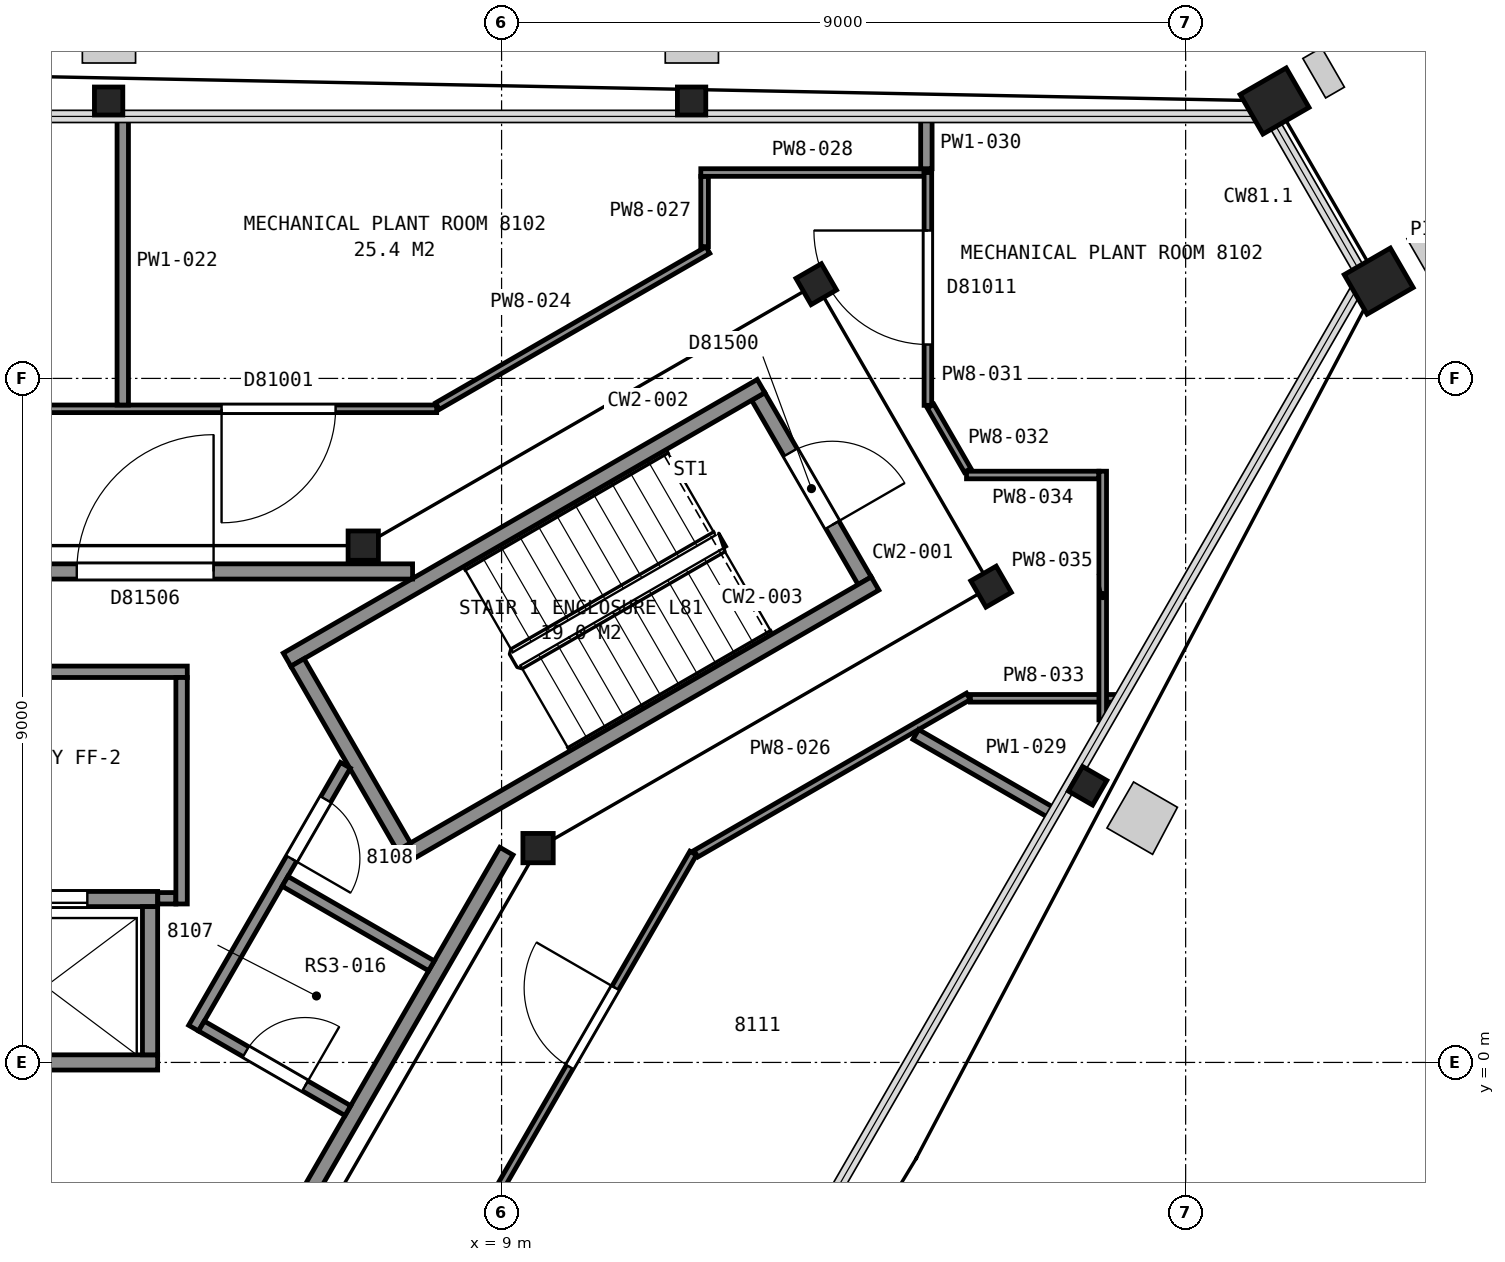
"""IFC4 building model, lengths in metres.
Left out: names, types, materials, properties, quantities, classifications, styles, units other than length and angle.
Written with IfcOpenShell. Run it as: python <this file> out.ifc"""

import sys

from ifc_helpers import new_model, si_unit, direction, frame, frame_2d, origin, origin_2d, place, context, subcontext, project, spatial, rectangle, hollow_rectangle, i_section, extrude, element, fill, save


model = new_model("IFC4")
c1 = context("Model", 3, precision=1e-05, world=origin(), true_north=direction((0.0, 1.0)))
c2 = subcontext(c1, "Body", "Model", "MODEL_VIEW")
j1 = project(units=[si_unit("LENGTHUNIT", "METRE"), si_unit("PLANEANGLEUNIT", "RADIAN")], contexts=[c1])
p1 = place(None, origin())
s1 = spatial("IfcSite", under=j1, at=p1, CompositionType="ELEMENT")
p2 = place(p1, origin())
s2 = spatial("IfcBuilding", under=s1, at=p2, CompositionType="ELEMENT")
p3 = place(p2, frame((0.0, 0.0, 321.0)))
s3 = spatial("IfcBuildingStorey", under=s2, at=p3, CompositionType="ELEMENT", Elevation=321.0)
p4 = place(p3, frame((19.17, 12.65, 0.0), z_axis=(0.0, 0.0, 1.0), x_axis=(0.5, -0.866025403784, 0.0)))
e1 = element("IfcColumn", 1, at=p4, inside=s3, PredefinedType="COLUMN", context=c2, shape_type="SweptSolid", body=[
    extrude(hollow_rectangle(XDim=0.6, YDim=0.7, WallThickness=0.04, at=origin_2d()), origin(), (0.0, 0.0, 1.0), 4.2),
])
for number, where, z_axis, x_axis in (
    (2, (11.5, 12.65, 0.0), (0.0, 0.0, 1.0), (1.0, 0.0, 0.0)),
    (3, (3.83, 12.65, 0.0), (0.0, 0.0, 1.0), (1.0, 0.0, 0.0)),
    (4, (16.71, 3.64, 0.0), (0.0, 0.0, 1.0), (-0.5, -0.866, 0.0)),
):
    element("IfcColumn", number, at=place(p3, frame(where, z_axis=z_axis, x_axis=x_axis)), inside=s3, PredefinedType="COLUMN", context=c2, shape_type="SweptSolid", body=[
        extrude(i_section(OverallWidth=0.373, OverallDepth=0.368, WebThickness=0.015, FlangeThickness=0.024, FilletRadius=0.015, at=origin_2d()), origin(), (0.0, 0.0, 1.0), 4.2),
    ])
p5 = place(p3, frame((20.54, 10.28, 0.0), z_axis=(0.0, 0.0, 1.0), x_axis=(0.5, -0.866025403784, 0.0)))
e5 = element("IfcColumn", 5, at=p5, inside=s3, PredefinedType="COLUMN", context=c2, shape_type="SweptSolid", body=[
    extrude(hollow_rectangle(XDim=0.6, YDim=0.7, WallThickness=0.04, at=origin_2d()), origin(), (0.0, 0.0, 1.0), 4.2),
])
for number, where, z_axis, x_axis in (
    (6, (9.48, 2.82, 0.0), (0.0, 0.0, 1.0), (1.0, 0.0, 0.0)),
    (7, (15.44, 6.26, 0.0), (0.0, 0.0, 1.0), (0.5, -0.866, 0.0)),
    (8, (13.14, 10.24, 0.0), (0.0, 0.0, 1.0), (0.5, -0.866, 0.0)),
    (9, (7.18, 6.8, 0.0), (0.0, 0.0, 1.0), (1.0, 0.0, 0.0)),
):
    element("IfcColumn", number, at=place(p3, frame(where, z_axis=z_axis, x_axis=x_axis)), inside=s3, PredefinedType="COLUMN", context=c2, shape_type="SweptSolid", body=[
        extrude(i_section(OverallWidth=0.399, OverallDepth=0.386, WebThickness=0.021, FlangeThickness=0.033, FilletRadius=0.015, at=origin_2d()), origin(), (0.0, 0.0, 1.0), 4.2),
    ])
p6 = place(p3, frame((13.777, 6.338, 0.0), z_axis=(0.0, 0.0, 1.0), x_axis=(-0.500049511043, 0.865996816683, 0.0)))
e10 = element("IfcWall", 10, at=p6, inside=s3, PredefinedType="PARTITIONING", context=c2, shape_type="SweptSolid", body=[
    extrude(rectangle(XDim=2.8, YDim=0.2, at=frame_2d((1.4, 0.0))), origin(), (0.0, 0.0, 1.0), 3.95),
])
p7 = place(p6, frame((0.85, 0.0, 0.0)))
e11 = element("IfcOpeningElement", 11, at=p7, cuts=e10, PredefinedType="OPENING", context=c2, shape_type="SweptSolid", body=[
    extrude(rectangle(XDim=1.1, YDim=2.1, at=frame_2d((0.55, 1.05))), frame((0.0, 0.11, 0.0), z_axis=(0.0, -1.0, 0.0), x_axis=(1.0, 0.0, 0.0)), (0.0, 0.0, 1.0), 0.22),
])
for number, where, z_axis, x_axis in (
    (12, (6.178, 5.299, 0.0), (0.0, 0.0, 1.0), (0.866, 0.5, 0.0)),
    (13, (7.678, 2.701, 0.0), (0.0, 0.0, 1.0), (0.866, 0.5, 0.0)),
):
    element("IfcWall", number, at=place(p3, frame(where, z_axis=z_axis, x_axis=x_axis)), inside=s3, PredefinedType="PARTITIONING", context=c2, shape_type="SweptSolid", body=[
        extrude(rectangle(XDim=7.2, YDim=0.2, at=frame_2d((3.6, 0.0))), origin(), (0.0, 0.0, 1.0), 3.95),
    ])
p8 = place(p3, frame((7.715, 2.838, 0.0), z_axis=(0.0, 0.0, 1.0), x_axis=(-0.500049511043, 0.865996816683, 0.0)))
e14 = element("IfcWall", 14, at=p8, inside=s3, PredefinedType="PARTITIONING", context=c2, shape_type="SweptSolid", body=[
    extrude(rectangle(XDim=2.8, YDim=0.2, at=frame_2d((1.4, 0.0))), origin(), (0.0, 0.0, 1.0), 3.95),
])
p9 = place(p3, frame((1.525, 0.0, 0.0), z_axis=(0.0, 0.0, 1.0), x_axis=(1.0, 0.0, 0.0)))
e15 = element("IfcWall", 15, at=p9, inside=s3, PredefinedType="PARTITIONING", context=c2, shape_type="SweptSolid", body=[
    extrude(rectangle(XDim=2.95, YDim=0.2, at=frame_2d((1.475, 0.0))), origin(), (0.0, 0.0, 1.0), 4.2),
])
p10 = place(p3, frame((1.525, 2.15, 0.0), z_axis=(0.0, 0.0, 1.0), x_axis=(1.0, 0.0, 0.0)))
e16 = element("IfcWall", 16, at=p10, inside=s3, PredefinedType="PARTITIONING", context=c2, shape_type="SweptSolid", body=[
    extrude(rectangle(XDim=2.95, YDim=0.2, at=frame_2d((1.475, 0.0))), origin(), (0.0, 0.0, 1.0), 4.2),
])
p11 = place(p10, frame((0.925, 0.0, 0.0)))
e17 = element("IfcOpeningElement", 17, at=p11, cuts=e16, PredefinedType="OPENING", context=c2, shape_type="SweptSolid", body=[
    extrude(rectangle(XDim=1.1, YDim=2.1, at=frame_2d((0.55, 1.05))), frame((0.0, 0.11, 0.0), z_axis=(0.0, -1.0, 0.0), x_axis=(1.0, 0.0, 0.0)), (0.0, 0.0, 1.0), 0.22),
])
p12 = place(p3, frame((4.375, 0.1, 0.0), z_axis=(0.0, 0.0, 1.0), x_axis=(0.0, 1.0, 0.0)))
e18 = element("IfcWall", 18, at=p12, inside=s3, PredefinedType="PARTITIONING", context=c2, shape_type="SweptSolid", body=[
    extrude(rectangle(XDim=1.95, YDim=0.2, at=frame_2d((0.975, 0.0))), origin(), (0.0, 0.0, 1.0), 4.2),
])
p13 = place(p3, frame((7.829, 6.46, 0.0), z_axis=(0.0, 0.0, 1.0), x_axis=(-1.0, 0.0, 0.0)))
e19 = element("IfcWall", 19, at=p13, inside=s3, PredefinedType="PARTITIONING", context=c2, shape_type="SweptSolid", body=[
    extrude(rectangle(XDim=15.658, YDim=0.2, at=frame_2d((7.829, 0.0))), origin(), (0.0, 0.0, 1.0), 3.95),
])
p14 = place(p13, frame((2.618, 0.0, 0.0)))
e20 = element("IfcOpeningElement", 20, at=p14, cuts=e19, PredefinedType="OPENING", context=c2, shape_type="SweptSolid", body=[
    extrude(rectangle(XDim=1.8, YDim=2.1, at=frame_2d((0.9, 1.05))), frame((0.0, 0.11, 0.0), z_axis=(0.0, -1.0, 0.0), x_axis=(1.0, 0.0, 0.0)), (0.0, 0.0, 1.0), 0.22),
])
p15 = place(p3, frame((-0.245, 5.14, 0.0), z_axis=(0.0, 0.0, 1.0), x_axis=(1.0, 0.0, 0.0)))
e21 = element("IfcWall", 21, at=p15, inside=s3, PredefinedType="PARTITIONING", context=c2, shape_type="SweptSolid", body=[
    extrude(rectangle(XDim=5.11, YDim=0.15, at=frame_2d((2.555, 0.0))), origin(), (0.0, 0.0, 1.0), 3.95),
])
p16 = place(p15, frame((1.975, 0.0, 0.0)))
e22 = element("IfcOpeningElement", 22, at=p16, cuts=e21, PredefinedType="OPENING", context=c2, shape_type="SweptSolid", body=[
    extrude(rectangle(XDim=1.0, YDim=2.1, at=frame_2d((0.5, 1.05))), frame((0.0, 0.085, 0.0), z_axis=(0.0, -1.0, 0.0), x_axis=(1.0, 0.0, 0.0)), (0.0, 0.0, 1.0), 0.17),
])
p17 = place(p3, frame((2.552, -8.5, 0.0), z_axis=(0.0, 0.0, 1.0), x_axis=(0.499967462014, 0.866044188784, 0.0)))
e23 = element("IfcWall", 23, at=p17, inside=s3, PredefinedType="PARTITIONING", context=c2, shape_type="SweptSolid", body=[
    extrude(rectangle(XDim=13.025, YDim=0.2, at=frame_2d((6.512, 0.0))), origin(), (0.0, 0.0, 1.0), 3.95),
])
p18 = place(p3, frame((4.477, 2.16, 0.0), z_axis=(0.0, 0.0, 1.0), x_axis=(1.0, 0.0, 0.0)))
e24 = element("IfcWall", 24, at=p18, inside=s3, PredefinedType="PARTITIONING", context=c2, shape_type="SweptSolid", body=[
    extrude(rectangle(XDim=0.238, YDim=0.15, at=frame_2d((0.119, 0.0))), origin(), (0.0, 0.0, 1.0), 3.95),
])
p19 = place(p3, frame((4.79, 2.085, 0.0), z_axis=(0.0, 0.0, 1.0), x_axis=(0.0, 1.0, 0.0)))
e25 = element("IfcWall", 25, at=p19, inside=s3, PredefinedType="PARTITIONING", context=c2, shape_type="SweptSolid", body=[
    extrude(rectangle(XDim=2.98, YDim=0.15, at=frame_2d((1.49, 0.0))), origin(), (0.0, 0.0, 1.0), 3.95),
])
p20 = place(p3, frame((6.946, 3.91, 0.0), z_axis=(0.0, 0.0, 1.0), x_axis=(-0.50003111728, -0.866007437469, 0.0)))
e26 = element("IfcWall", 26, at=p20, inside=s3, PredefinedType="PARTITIONING", context=c2, shape_type="SweptSolid", body=[
    extrude(rectangle(XDim=3.994, YDim=0.15, at=frame_2d((1.997, 0.0))), origin(), (0.0, 0.0, 1.0), 3.95),
])
p21 = place(p20, frame((0.519, 0.0, 0.0)))
e27 = element("IfcOpeningElement", 27, at=p21, cuts=e26, PredefinedType="OPENING", context=c2, shape_type="SweptSolid", body=[
    extrude(rectangle(XDim=0.9, YDim=2.1, at=frame_2d((0.45, 1.05))), frame((0.0, 0.085, 0.0), z_axis=(0.0, -1.0, 0.0), x_axis=(1.0, 0.0, 0.0)), (0.0, 0.0, 1.0), 0.17),
])
p22 = place(p3, frame((5.051, 0.479, 0.0), z_axis=(0.0, 0.0, 1.0), x_axis=(0.865944298464, -0.500140452231, 0.0)))
e28 = element("IfcWall", 28, at=p22, inside=s3, PredefinedType="PARTITIONING", context=c2, shape_type="SweptSolid", body=[
    extrude(rectangle(XDim=2.224, YDim=0.15, at=frame_2d((1.112, 0.0))), origin(), (0.0, 0.0, 1.0), 3.95),
])
p23 = place(p22, frame((0.675, 0.0, 0.0)))
e29 = element("IfcOpeningElement", 29, at=p23, cuts=e28, PredefinedType="OPENING", context=c2, shape_type="SweptSolid", body=[
    extrude(rectangle(XDim=0.9, YDim=2.1, at=frame_2d((0.45, 1.05))), frame((0.0, 0.085, 0.0), z_axis=(0.0, -1.0, 0.0), x_axis=(1.0, 0.0, 0.0)), (0.0, 0.0, 1.0), 0.17),
])
p24 = place(p3, frame((6.151, 2.384, 0.0), z_axis=(0.0, 0.0, 1.0), x_axis=(0.865971748, -0.500092923031, 0.0)))
e30 = element("IfcWall", 30, at=p24, inside=s3, PredefinedType="PARTITIONING", context=c2, shape_type="SweptSolid", body=[
    extrude(rectangle(XDim=2.225, YDim=0.15, at=frame_2d((1.112, 0.0))), origin(), (0.0, 0.0, 1.0), 3.95),
])
p25 = place(p3, frame((-8.146, 8.6, 0.0), z_axis=(0.0, 0.0, 1.0), x_axis=(1.0, 0.0, 0.0)))
e31 = element("IfcWall", 31, at=p25, inside=s3, PredefinedType="PARTITIONING", context=c2, shape_type="SweptSolid", body=[
    extrude(rectangle(XDim=16.292, YDim=0.1, at=frame_2d((8.146, 0.0))), origin(), (0.0, 0.0, 1.0), 3.297),
])
p26 = place(p25, frame((13.462, 0.0, 0.0)))
e32 = element("IfcOpeningElement", 32, at=p26, cuts=e31, PredefinedType="OPENING", context=c2, shape_type="SweptSolid", body=[
    extrude(rectangle(XDim=1.5, YDim=2.1, at=frame_2d((0.75, 1.05))), frame((0.0, 0.06, 0.0), z_axis=(0.0, -1.0, 0.0), x_axis=(1.0, 0.0, 0.0)), (0.0, 0.0, 1.0), 0.12),
])
p27 = place(p25, frame((5.641, 0.0, 0.0)))
e33 = element("IfcOpeningElement", 33, at=p27, cuts=e31, PredefinedType="OPENING", context=c2, shape_type="SweptSolid", body=[
    extrude(rectangle(XDim=1.5, YDim=2.1, at=frame_2d((0.75, 1.05))), frame((0.0, 0.06, 0.0), z_axis=(0.0, -1.0, 0.0), x_axis=(1.0, 0.0, 0.0)), (0.0, 0.0, 1.0), 0.12),
])
p28 = place(p3, frame((11.521, 2.754, 0.0), z_axis=(0.0, 0.0, 1.0), x_axis=(-0.500044034969, -0.86599997869, 0.0)))
e34 = element("IfcWall", 34, at=p28, inside=s3, PredefinedType="PARTITIONING", context=c2, shape_type="SweptSolid", body=[
    extrude(rectangle(XDim=15.553, YDim=0.1, at=frame_2d((7.776, 0.0))), origin(), (0.0, 0.0, 1.0), 3.297),
])
p29 = place(p28, frame((13.803, 0.0, 0.0)))
e35 = element("IfcOpeningElement", 35, at=p29, cuts=e34, PredefinedType="OPENING", context=c2, shape_type="SweptSolid", body=[
    extrude(rectangle(XDim=1.2, YDim=2.1, at=frame_2d((0.6, 1.05))), frame((0.0, 0.06, 0.0), z_axis=(0.0, -1.0, 0.0), x_axis=(1.0, 0.0, 0.0)), (0.0, 0.0, 1.0), 0.12),
])
p30 = place(p28, frame((8.665, 0.0, 0.0)))
e36 = element("IfcOpeningElement", 36, at=p30, cuts=e34, PredefinedType="OPENING", context=c2, shape_type="SweptSolid", body=[
    extrude(rectangle(XDim=1.2, YDim=2.1, at=frame_2d((0.6, 1.05))), frame((0.0, 0.06, 0.0), z_axis=(0.0, -1.0, 0.0), x_axis=(1.0, 0.0, 0.0)), (0.0, 0.0, 1.0), 0.12),
])
p31 = place(p28, frame((2.049, 0.0, 0.0)))
e37 = element("IfcOpeningElement", 37, at=p31, cuts=e34, PredefinedType="OPENING", context=c2, shape_type="SweptSolid", body=[
    extrude(rectangle(XDim=1.2, YDim=2.1, at=frame_2d((0.6, 1.05))), frame((0.0, 0.06, 0.0), z_axis=(0.0, -1.0, 0.0), x_axis=(1.0, 0.0, 0.0)), (0.0, 0.0, 1.0), 0.12),
])
p32 = place(p3, frame((4.016, 8.65, 0.0), z_axis=(0.0, 0.0, 1.0), x_axis=(0.0, 1.0, 0.0)))
e38 = element("IfcWall", 38, at=p32, inside=s3, PredefinedType="PARTITIONING", context=c2, shape_type="SweptSolid", body=[
    extrude(rectangle(XDim=3.783, YDim=0.15, at=frame_2d((1.892, 0.0))), origin(), (0.0, 0.0, 1.0), 3.297),
])
p33 = place(p3, frame((8.157, 8.635, 0.0), z_axis=(0.0, 0.0, 1.0), x_axis=(0.866029215606, 0.499993397673, 0.0)))
e39 = element("IfcWall", 39, at=p33, inside=s3, PredefinedType="PARTITIONING", context=c2, shape_type="SweptSolid", body=[
    extrude(rectangle(XDim=4.108, YDim=0.1, at=frame_2d((2.054, 0.0))), origin(), (0.0, 0.0, 1.0), 3.297),
])
p34 = place(p3, frame((11.557, 2.746, 0.0), z_axis=(0.0, 0.0, 1.0), x_axis=(0.866005840187, 0.500033883614, 0.0)))
e40 = element("IfcWall", 40, at=p34, inside=s3, PredefinedType="PARTITIONING", context=c2, shape_type="SweptSolid", body=[
    extrude(rectangle(XDim=4.139, YDim=0.1, at=frame_2d((2.07, 0.0))), origin(), (0.0, 0.0, 1.0), 3.297),
])
p35 = place(p3, frame((11.671, 10.734, 0.0), z_axis=(0.0, 0.0, 1.0), x_axis=(0.0, 1.0, 0.0)))
e41 = element("IfcWall", 41, at=p35, inside=s3, PredefinedType="PARTITIONING", context=c2, shape_type="SweptSolid", body=[
    extrude(rectangle(XDim=0.925, YDim=0.1, at=frame_2d((0.462, 0.0))), origin(), (0.0, 0.0, 1.0), 3.297),
])
p36 = place(p3, frame((11.621, 11.709, 0.0), z_axis=(0.0, 0.0, 1.0), x_axis=(1.0, 0.0, 0.0)))
e42 = element("IfcWall", 42, at=p36, inside=s3, PredefinedType="PARTITIONING", context=c2, shape_type="SweptSolid", body=[
    extrude(rectangle(XDim=2.938, YDim=0.1, at=frame_2d((1.469, 0.0))), origin(), (0.0, 0.0, 1.0), 3.297),
])
p37 = place(p3, frame((14.449, 4.315, 0.0), z_axis=(0.0, 0.0, 1.0), x_axis=(0.865991778511, -0.500058236159, 0.0)))
e43 = element("IfcWall", 43, at=p37, inside=s3, PredefinedType="PARTITIONING", context=c2, shape_type="SweptSolid", body=[
    extrude(rectangle(XDim=2.077, YDim=0.15, at=frame_2d((1.039, 0.0))), origin(), (0.0, 0.0, 1.0), 3.297),
])
p38 = place(p3, frame((14.589, 11.759, 0.0), z_axis=(0.0, 0.0, 1.0), x_axis=(0.0, 1.0, 0.0)))
e44 = element("IfcWall", 44, at=p38, inside=s3, PredefinedType="PARTITIONING", context=c2, shape_type="SweptSolid", body=[
    extrude(rectangle(XDim=0.674, YDim=0.15, at=frame_2d((0.337, 0.0))), origin(), (0.0, 0.0, 1.0), 3.297),
])
p39 = place(p3, frame((14.609, 11.709, 0.0), z_axis=(0.0, 0.0, 1.0), x_axis=(0.0, -1.0, 0.0)))
e45 = element("IfcWall", 45, at=p39, inside=s3, PredefinedType="PARTITIONING", context=c2, shape_type="SweptSolid", body=[
    extrude(rectangle(XDim=3.063, YDim=0.1, at=frame_2d((1.531, 0.0))), origin(), (0.0, 0.0, 1.0), 3.297),
])
p40 = place(p39, frame((0.763, 0.0, 0.0)))
e46 = element("IfcOpeningElement", 46, at=p40, cuts=e45, PredefinedType="OPENING", context=c2, shape_type="SweptSolid", body=[
    extrude(rectangle(XDim=1.5, YDim=2.1, at=frame_2d((0.75, 1.05))), frame((0.0, 0.06, 0.0), z_axis=(0.0, -1.0, 0.0), x_axis=(1.0, 0.0, 0.0)), (0.0, 0.0, 1.0), 0.12),
])
p41 = place(p3, frame((14.644, 8.635, 0.0), z_axis=(0.0, 0.0, 1.0), x_axis=(0.499823463829, -0.866127303003, 0.0)))
e47 = element("IfcWall", 47, at=p41, inside=s3, PredefinedType="PARTITIONING", context=c2, shape_type="SweptSolid", body=[
    extrude(rectangle(XDim=0.976, YDim=0.1, at=frame_2d((0.488, 0.0))), origin(), (0.0, 0.0, 1.0), 3.297),
])
p42 = place(p3, frame((15.168, 4.791, 0.0), z_axis=(0.0, 0.0, 1.0), x_axis=(1.0, 0.0, 0.0)))
e48 = element("IfcWall", 48, at=p42, inside=s3, PredefinedType="PARTITIONING", context=c2, shape_type="SweptSolid", body=[
    extrude(rectangle(XDim=1.926, YDim=0.1, at=frame_2d((0.963, 0.0))), origin(), (0.0, 0.0, 1.0), 3.297),
])
p43 = place(p3, frame((15.117, 7.729, 0.0), z_axis=(0.0, 0.0, 1.0), x_axis=(1.0, 0.0, 0.0)))
e49 = element("IfcWall", 49, at=p43, inside=s3, PredefinedType="PARTITIONING", context=c2, shape_type="SweptSolid", body=[
    extrude(rectangle(XDim=1.742, YDim=0.1, at=frame_2d((0.871, 0.0))), origin(), (0.0, 0.0, 1.0), 3.297),
])
p44 = place(p3, frame((16.909, 4.507, 0.0), z_axis=(0.0, 0.0, 1.0), x_axis=(0.0, 1.0, 0.0)))
e50 = element("IfcWall", 50, at=p44, inside=s3, PredefinedType="PARTITIONING", context=c2, shape_type="SweptSolid", body=[
    extrude(rectangle(XDim=3.272, YDim=0.1, at=frame_2d((1.636, 0.0))), origin(), (0.0, 0.0, 1.0), 3.297),
])
p45 = place(p7, origin())
e51 = element("IfcDoor", 51, at=p45, inside=s3, OperationType="SINGLE_SWING_LEFT", PredefinedType="DOOR", context=c2, shape_type="SweptSolid", body=[
    extrude(rectangle(XDim=1.1, YDim=2.1, at=frame_2d((0.55, 1.05))), frame((0.0, 0.025, 0.0), z_axis=(0.0, -1.0, 0.0), x_axis=(1.0, 0.0, 0.0)), (0.0, 0.0, 1.0), 0.05),
])
fill(e11, e51)
p46 = place(p11, origin())
e52 = element("IfcDoor", 52, at=p46, inside=s3, OperationType="SLIDING_TO_RIGHT", PredefinedType="DOOR", context=c2, shape_type="SweptSolid", body=[
    extrude(rectangle(XDim=1.1, YDim=2.1, at=frame_2d((0.55, 1.05))), frame((0.0, 0.025, 0.0), z_axis=(0.0, -1.0, 0.0), x_axis=(1.0, 0.0, 0.0)), (0.0, 0.0, 1.0), 0.05),
])
fill(e17, e52)
p47 = place(p14, origin())
e53 = element("IfcDoor", 53, at=p47, inside=s3, OperationType="DOUBLE_DOOR_SINGLE_SWING", PredefinedType="DOOR", context=c2, shape_type="SweptSolid", body=[
    extrude(rectangle(XDim=1.8, YDim=2.1, at=frame_2d((0.9, 1.05))), frame((0.0, 0.025, 0.0), z_axis=(0.0, -1.0, 0.0), x_axis=(1.0, 0.0, 0.0)), (0.0, 0.0, 1.0), 0.05),
])
fill(e20, e53)
p48 = place(p21, origin())
e54 = element("IfcDoor", 54, at=p48, inside=s3, OperationType="SINGLE_SWING_RIGHT", PredefinedType="DOOR", context=c2, shape_type="SweptSolid", body=[
    extrude(rectangle(XDim=0.9, YDim=2.1, at=frame_2d((0.45, 1.05))), frame((0.0, 0.025, 0.0), z_axis=(0.0, -1.0, 0.0), x_axis=(1.0, 0.0, 0.0)), (0.0, 0.0, 1.0), 0.05),
])
fill(e27, e54)
p49 = place(p23, origin())
e55 = element("IfcDoor", 55, at=p49, inside=s3, OperationType="SINGLE_SWING_RIGHT", PredefinedType="DOOR", context=c2, shape_type="SweptSolid", body=[
    extrude(rectangle(XDim=0.9, YDim=2.1, at=frame_2d((0.45, 1.05))), frame((0.0, 0.025, 0.0), z_axis=(0.0, -1.0, 0.0), x_axis=(1.0, 0.0, 0.0)), (0.0, 0.0, 1.0), 0.05),
])
fill(e29, e55)
p50 = place(p26, origin())
e56 = element("IfcDoor", 56, at=p50, inside=s3, OperationType="DOUBLE_DOOR_SINGLE_SWING", PredefinedType="DOOR", context=c2, shape_type="SweptSolid", body=[
    extrude(rectangle(XDim=1.5, YDim=2.1, at=frame_2d((0.75, 1.05))), frame((0.0, 0.025, 0.0), z_axis=(0.0, -1.0, 0.0), x_axis=(1.0, 0.0, 0.0)), (0.0, 0.0, 1.0), 0.05),
])
fill(e32, e56)
p51 = place(p31, origin())
e57 = element("IfcDoor", 57, at=p51, inside=s3, OperationType="SINGLE_SWING_LEFT", PredefinedType="DOOR", context=c2, shape_type="SweptSolid", body=[
    extrude(rectangle(XDim=1.2, YDim=2.1, at=frame_2d((0.6, 1.05))), frame((0.0, 0.025, 0.0), z_axis=(0.0, -1.0, 0.0), x_axis=(1.0, 0.0, 0.0)), (0.0, 0.0, 1.0), 0.05),
])
fill(e37, e57)
p52 = place(p40, origin())
e58 = element("IfcDoor", 58, at=p52, inside=s3, OperationType="DOUBLE_DOOR_SINGLE_SWING", PredefinedType="DOOR", context=c2, shape_type="SweptSolid", body=[
    extrude(rectangle(XDim=1.5, YDim=2.1, at=frame_2d((0.75, 1.05))), frame((0.0, 0.025, 0.0), z_axis=(0.0, -1.0, 0.0), x_axis=(1.0, 0.0, 0.0)), (0.0, 0.0, 1.0), 0.05),
])
fill(e46, e58)
save(model, sys.argv[1])
